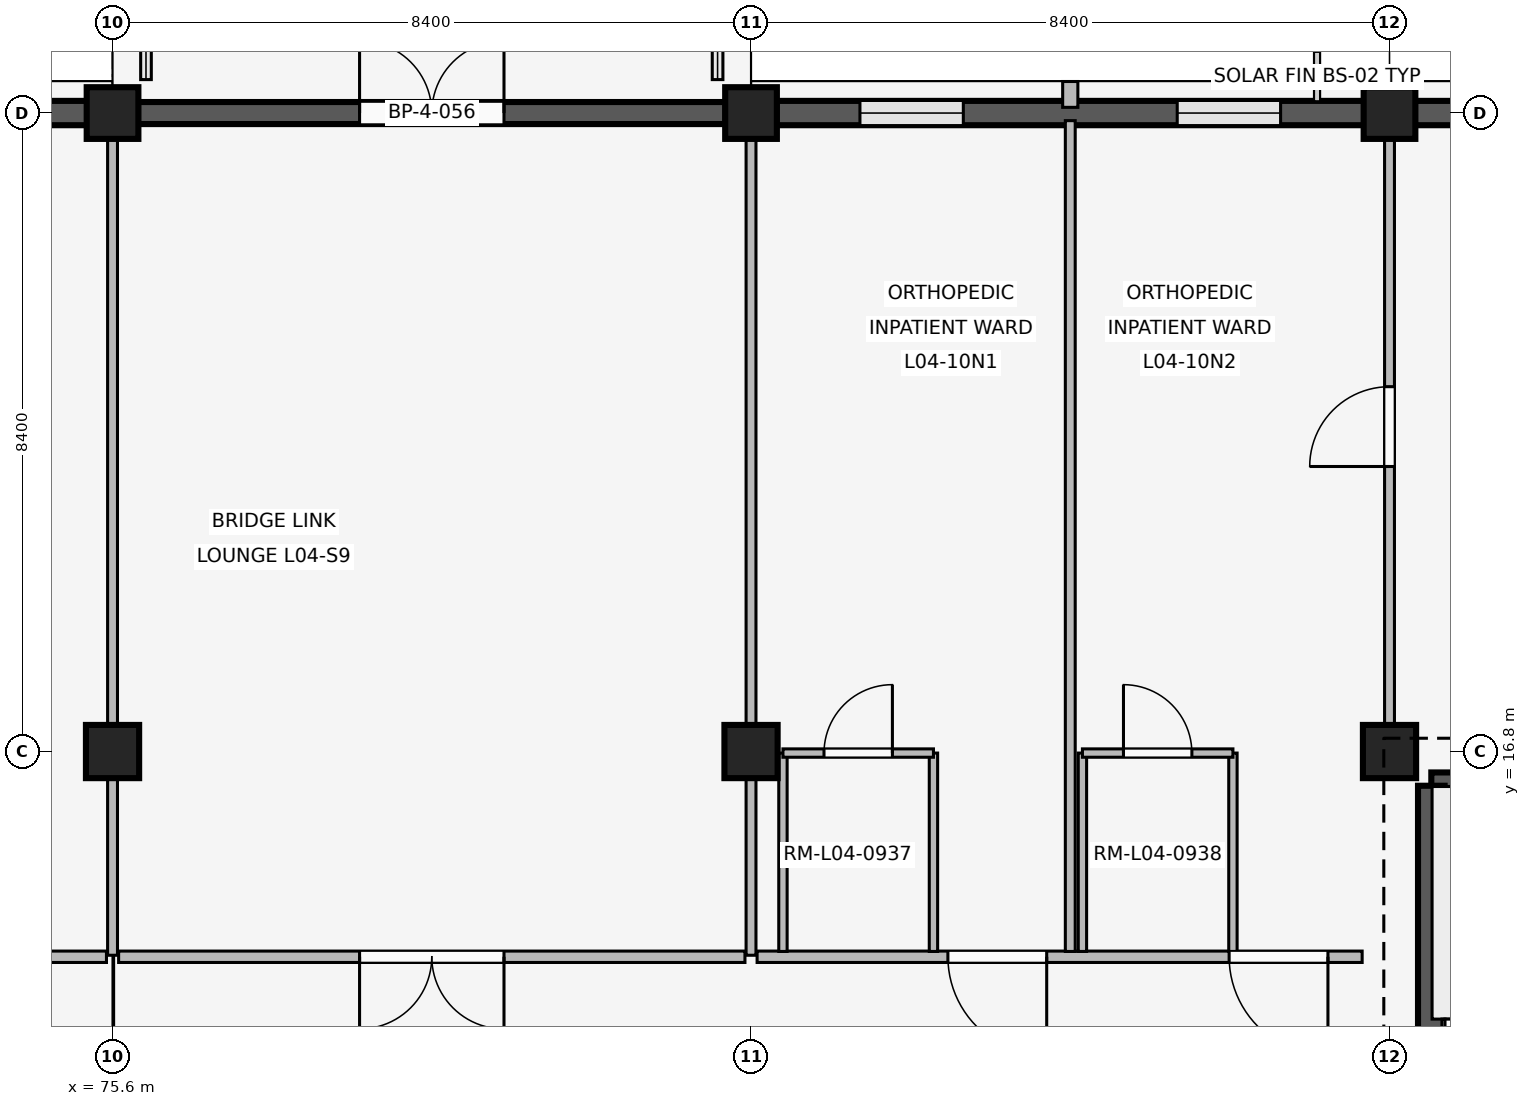
"""IFC4 building model, lengths in metres.
Left out: names, types, materials, properties, quantities, classifications, styles, units other than length and angle.
Written with IfcOpenShell. Run it as: python <this file> out.ifc"""

import sys

from ifc_helpers import new_model, si_unit, direction, frame, frame_2d, origin, origin_2d, place, context, subcontext, project, spatial, rectangle, extrude, element, fill, save


model = new_model("IFC4")
c1 = context("Model", 3, precision=1e-05, world=origin(), true_north=direction((0.0, 1.0)))
c2 = subcontext(c1, "Body", "Model", "MODEL_VIEW")
j1 = project(units=[si_unit("LENGTHUNIT", "METRE"), si_unit("PLANEANGLEUNIT", "RADIAN")], contexts=[c1])
p1 = place(None, origin())
s1 = spatial("IfcSite", under=j1, at=p1, CompositionType="ELEMENT")
p2 = place(p1, origin())
s2 = spatial("IfcBuilding", under=s1, at=p2, CompositionType="ELEMENT")
p3 = place(p2, frame((0.0, 0.0, 16.2)))
s3 = spatial("IfcBuildingStorey", under=s2, at=p3, CompositionType="ELEMENT", Elevation=16.2)
p4 = place(p3, frame((75.6, 16.8, 0.0), z_axis=(0.0, 0.0, 1.0), x_axis=(1.0, 0.0, 0.0)))
e1 = element("IfcColumn", 1, at=p4, inside=s3, PredefinedType="COLUMN", context=c2, shape_type="SweptSolid", body=[
    extrude(rectangle(XDim=0.7, YDim=0.7, at=origin_2d()), origin(), (0.0, 0.0, 1.0), 4.2),
])
p5 = place(p3, frame((75.6, 25.2, 0.0), z_axis=(0.0, 0.0, 1.0), x_axis=(1.0, 0.0, 0.0)))
e2 = element("IfcColumn", 2, at=p5, inside=s3, PredefinedType="COLUMN", context=c2, shape_type="SweptSolid", body=[
    extrude(rectangle(XDim=0.68, YDim=0.68, at=origin_2d()), origin(), (0.0, 0.0, 1.0), 4.2),
])
p6 = place(p3, frame((84.0, 16.8, 0.0), z_axis=(0.0, 0.0, 1.0), x_axis=(1.0, 0.0, 0.0)))
e3 = element("IfcColumn", 3, at=p6, inside=s3, PredefinedType="COLUMN", context=c2, shape_type="SweptSolid", body=[
    extrude(rectangle(XDim=0.7, YDim=0.7, at=origin_2d()), origin(), (0.0, 0.0, 1.0), 4.2),
])
p7 = place(p3, frame((84.0, 25.2, 0.0), z_axis=(0.0, 0.0, 1.0), x_axis=(1.0, 0.0, 0.0)))
e4 = element("IfcColumn", 4, at=p7, inside=s3, PredefinedType="COLUMN", context=c2, shape_type="SweptSolid", body=[
    extrude(rectangle(XDim=0.68, YDim=0.68, at=origin_2d()), origin(), (0.0, 0.0, 1.0), 4.2),
])
p8 = place(p3, frame((92.4, 16.8, 0.0), z_axis=(0.0, 0.0, 1.0), x_axis=(1.0, 0.0, 0.0)))
e5 = element("IfcColumn", 5, at=p8, inside=s3, PredefinedType="COLUMN", context=c2, shape_type="SweptSolid", body=[
    extrude(rectangle(XDim=0.7, YDim=0.7, at=origin_2d()), origin(), (0.0, 0.0, 1.0), 4.2),
])
p9 = place(p3, frame((92.4, 25.2, 0.0), z_axis=(0.0, 0.0, 1.0), x_axis=(1.0, 0.0, 0.0)))
e6 = element("IfcColumn", 6, at=p9, inside=s3, PredefinedType="COLUMN", context=c2, shape_type="SweptSolid", body=[
    extrude(rectangle(XDim=0.68, YDim=0.68, at=origin_2d()), origin(), (0.0, 0.0, 1.0), 4.2),
])
p10 = place(p3, frame((67.535, 25.2, 0.0), z_axis=(0.0, 0.0, 1.0), x_axis=(1.0, 0.0, 0.0)))
e7 = element("IfcWall", 7, at=p10, inside=s3, PredefinedType="SOLIDWALL", context=c2, shape_type="SweptSolid", body=[
    extrude(rectangle(XDim=7.73, YDim=0.32, at=frame_2d((3.865, 0.0))), origin(), (0.0, 0.0, 1.0), 3.32),
])
p11 = place(p10, frame((1.078, 0.0, 0.85)))
e8 = element("IfcOpeningElement", 8, at=p11, cuts=e7, PredefinedType="OPENING", context=c2, shape_type="SweptSolid", body=[
    extrude(rectangle(XDim=1.4, YDim=1.4, at=frame_2d((0.7, 0.7))), frame((0.0, 0.17, 0.0), z_axis=(0.0, -1.0, 0.0), x_axis=(1.0, 0.0, 0.0)), (0.0, 0.0, 1.0), 0.34),
])
p12 = place(p10, frame((5.252, 0.0, 0.85)))
e9 = element("IfcOpeningElement", 9, at=p12, cuts=e7, PredefinedType="OPENING", context=c2, shape_type="SweptSolid", body=[
    extrude(rectangle(XDim=1.4, YDim=1.4, at=frame_2d((0.7, 0.7))), frame((0.0, 0.17, 0.0), z_axis=(0.0, -1.0, 0.0), x_axis=(1.0, 0.0, 0.0)), (0.0, 0.0, 1.0), 0.34),
])
p13 = place(p3, frame((75.935, 25.2, 0.0), z_axis=(0.0, 0.0, 1.0), x_axis=(1.0, 0.0, 0.0)))
e10 = element("IfcWall", 10, at=p13, inside=s3, PredefinedType="SOLIDWALL", context=c2, shape_type="SweptSolid", body=[
    extrude(rectangle(XDim=7.73, YDim=0.29, at=frame_2d((3.865, 0.0))), origin(), (0.0, 0.0, 1.0), 3.32),
])
p14 = place(p13, frame((2.915, 0.0, 0.0)))
e11 = element("IfcOpeningElement", 11, at=p14, cuts=e10, PredefinedType="OPENING", context=c2, shape_type="SweptSolid", body=[
    extrude(rectangle(XDim=1.9, YDim=2.4, at=frame_2d((0.95, 1.2))), frame((0.0, 0.155, 0.0), z_axis=(0.0, -1.0, 0.0), x_axis=(1.0, 0.0, 0.0)), (0.0, 0.0, 1.0), 0.31),
])
p15 = place(p3, frame((84.335, 25.2, 0.0), z_axis=(0.0, 0.0, 1.0), x_axis=(1.0, 0.0, 0.0)))
e12 = element("IfcWall", 12, at=p15, inside=s3, PredefinedType="SOLIDWALL", context=c2, shape_type="SweptSolid", body=[
    extrude(rectangle(XDim=7.73, YDim=0.32, at=frame_2d((3.865, 0.0))), origin(), (0.0, 0.0, 1.0), 3.32),
])
p16 = place(p15, frame((1.098, 0.0, 0.85)))
e13 = element("IfcOpeningElement", 13, at=p16, cuts=e12, PredefinedType="OPENING", context=c2, shape_type="SweptSolid", body=[
    extrude(rectangle(XDim=1.36, YDim=1.42, at=frame_2d((0.68, 0.71))), frame((0.0, 0.17, 0.0), z_axis=(0.0, -1.0, 0.0), x_axis=(1.0, 0.0, 0.0)), (0.0, 0.0, 1.0), 0.34),
])
p17 = place(p15, frame((5.272, 0.0, 0.85)))
e14 = element("IfcOpeningElement", 14, at=p17, cuts=e12, PredefinedType="OPENING", context=c2, shape_type="SweptSolid", body=[
    extrude(rectangle(XDim=1.36, YDim=1.42, at=frame_2d((0.68, 0.71))), frame((0.0, 0.17, 0.0), z_axis=(0.0, -1.0, 0.0), x_axis=(1.0, 0.0, 0.0)), (0.0, 0.0, 1.0), 0.34),
])
p18 = place(p3, frame((88.2, 25.275, 0.0), z_axis=(0.0, 0.0, 1.0), x_axis=(0.0, 1.0, 0.0)))
e15 = element("IfcWall", 15, at=p18, inside=s3, PredefinedType="ELEMENTEDWALL", context=c2, shape_type="SweptSolid", body=[
    extrude(rectangle(XDim=0.34, YDim=0.2, at=frame_2d((0.17, 0.0))), origin(), (0.0, 0.0, 1.0), 3.3),
])
p19 = place(p3, frame((92.735, 25.2, 0.0), z_axis=(0.0, 0.0, 1.0), x_axis=(1.0, 0.0, 0.0)))
e16 = element("IfcWall", 16, at=p19, inside=s3, PredefinedType="SOLIDWALL", context=c2, shape_type="SweptSolid", body=[
    extrude(rectangle(XDim=7.73, YDim=0.32, at=frame_2d((3.865, 0.0))), origin(), (0.0, 0.0, 1.0), 3.32),
])
p20 = place(p19, frame((1.138, 0.0, 0.85)))
e17 = element("IfcOpeningElement", 17, at=p20, cuts=e16, PredefinedType="OPENING", context=c2, shape_type="SweptSolid", body=[
    extrude(rectangle(XDim=1.28, YDim=1.38, at=frame_2d((0.64, 0.69))), frame((0.0, 0.17, 0.0), z_axis=(0.0, -1.0, 0.0), x_axis=(1.0, 0.0, 0.0)), (0.0, 0.0, 1.0), 0.34),
])
p21 = place(p19, frame((5.312, 0.0, 0.85)))
e18 = element("IfcOpeningElement", 18, at=p21, cuts=e16, PredefinedType="OPENING", context=c2, shape_type="SweptSolid", body=[
    extrude(rectangle(XDim=1.28, YDim=1.38, at=frame_2d((0.64, 0.69))), frame((0.0, 0.17, 0.0), z_axis=(0.0, -1.0, 0.0), x_axis=(1.0, 0.0, 0.0)), (0.0, 0.0, 1.0), 0.34),
])
p22 = place(p3, frame((92.95, 16.35, 0.0), z_axis=(0.0, 0.0, 1.0), x_axis=(1.0, 0.0, 0.0)))
e19 = element("IfcWall", 19, at=p22, inside=s3, PredefinedType="SHEAR", context=c2, shape_type="SweptSolid", body=[
    extrude(rectangle(XDim=7.5, YDim=0.35, at=frame_2d((3.75, 0.0))), origin(), (0.0, 0.0, 1.0), 3.92),
])
p23 = place(p3, frame((92.95, 8.8, 0.0), z_axis=(0.0, 0.0, 1.0), x_axis=(0.0, 1.0, 0.0)))
e20 = element("IfcWall", 20, at=p23, inside=s3, PredefinedType="SHEAR", context=c2, shape_type="SweptSolid", body=[
    extrude(rectangle(XDim=7.55, YDim=0.35, at=frame_2d((3.775, 0.0))), origin(), (0.0, 0.0, 1.0), 3.92),
])
p24 = place(p23, frame((0.28, 0.0, 0.0)))
e21 = element("IfcOpeningElement", 21, at=p24, cuts=e20, PredefinedType="OPENING", context=c2, shape_type="SweptSolid", body=[
    extrude(rectangle(XDim=1.0, YDim=2.15, at=frame_2d((0.5, 1.075))), frame((0.0, 0.185, 0.0), z_axis=(0.0, -1.0, 0.0), x_axis=(1.0, 0.0, 0.0)), (0.0, 0.0, 1.0), 0.37),
])
p25 = place(p3, frame((75.52, 14.1, 0.0), z_axis=(0.0, 0.0, 1.0), x_axis=(-1.0, 0.0, 0.0)))
e22 = element("IfcWall", 22, at=p25, inside=s3, PredefinedType="PARTITIONING", context=c2, shape_type="SweptSolid", body=[
    extrude(rectangle(XDim=8.24, YDim=0.15, at=frame_2d((4.12, 0.0))), origin(), (0.0, 0.0, 1.0), 3.3),
])
p26 = place(p25, frame((3.495, 0.0, 0.0)))
e23 = element("IfcOpeningElement", 23, at=p26, cuts=e22, PredefinedType="OPENING", context=c2, shape_type="SweptSolid", body=[
    extrude(rectangle(XDim=1.25, YDim=2.2, at=frame_2d((0.625, 1.1))), frame((0.0, 0.085, 0.0), z_axis=(0.0, -1.0, 0.0), x_axis=(1.0, 0.0, 0.0)), (0.0, 0.0, 1.0), 0.17),
])
p27 = place(p3, frame((75.6, 14.12, 0.0), z_axis=(0.0, 0.0, 1.0), x_axis=(0.0, 1.0, 0.0)))
e24 = element("IfcWall", 24, at=p27, inside=s3, PredefinedType="PARTITIONING", context=c2, shape_type="SweptSolid", body=[
    extrude(rectangle(XDim=10.94, YDim=0.13, at=frame_2d((5.47, 0.0))), origin(), (0.0, 0.0, 1.0), 3.3),
])
p28 = place(p3, frame((83.92, 14.1, 0.0), z_axis=(0.0, 0.0, 1.0), x_axis=(-1.0, 0.0, 0.0)))
e25 = element("IfcWall", 25, at=p28, inside=s3, PredefinedType="PARTITIONING", context=c2, shape_type="SweptSolid", body=[
    extrude(rectangle(XDim=8.24, YDim=0.15, at=frame_2d((4.12, 0.0))), origin(), (0.0, 0.0, 1.0), 3.3),
])
p29 = place(p28, frame((3.17, 0.0, 0.0)))
e26 = element("IfcOpeningElement", 26, at=p29, cuts=e25, PredefinedType="OPENING", context=c2, shape_type="SweptSolid", body=[
    extrude(rectangle(XDim=1.9, YDim=2.4, at=frame_2d((0.95, 1.2))), frame((0.0, 0.085, 0.0), z_axis=(0.0, -1.0, 0.0), x_axis=(1.0, 0.0, 0.0)), (0.0, 0.0, 1.0), 0.17),
])
p30 = place(p3, frame((84.0, 14.12, 0.0), z_axis=(0.0, 0.0, 1.0), x_axis=(0.0, 1.0, 0.0)))
e27 = element("IfcWall", 27, at=p30, inside=s3, PredefinedType="PARTITIONING", context=c2, shape_type="SweptSolid", body=[
    extrude(rectangle(XDim=10.94, YDim=0.13, at=frame_2d((5.47, 0.0))), origin(), (0.0, 0.0, 1.0), 3.3),
])
p31 = place(p3, frame((92.04, 14.1, 0.0), z_axis=(0.0, 0.0, 1.0), x_axis=(-1.0, 0.0, 0.0)))
e28 = element("IfcWall", 28, at=p31, inside=s3, PredefinedType="PARTITIONING", context=c2, shape_type="SweptSolid", body=[
    extrude(rectangle(XDim=7.96, YDim=0.15, at=frame_2d((3.98, 0.0))), origin(), (0.0, 0.0, 1.0), 3.3),
])
p32 = place(p31, frame((0.45, 0.0, 0.0)))
e29 = element("IfcOpeningElement", 29, at=p32, cuts=e28, PredefinedType="OPENING", context=c2, shape_type="SweptSolid", body=[
    extrude(rectangle(XDim=1.3, YDim=2.25, at=frame_2d((0.65, 1.125))), frame((0.0, 0.085, 0.0), z_axis=(0.0, -1.0, 0.0), x_axis=(1.0, 0.0, 0.0)), (0.0, 0.0, 1.0), 0.17),
])
p33 = place(p31, frame((4.15, 0.0, 0.0)))
e30 = element("IfcOpeningElement", 30, at=p33, cuts=e28, PredefinedType="OPENING", context=c2, shape_type="SweptSolid", body=[
    extrude(rectangle(XDim=1.3, YDim=2.25, at=frame_2d((0.65, 1.125))), frame((0.0, 0.085, 0.0), z_axis=(0.0, -1.0, 0.0), x_axis=(1.0, 0.0, 0.0)), (0.0, 0.0, 1.0), 0.17),
])
p34 = place(p3, frame((88.2, 14.17, 0.0), z_axis=(0.0, 0.0, 1.0), x_axis=(0.0, 1.0, 0.0)))
e31 = element("IfcWall", 31, at=p34, inside=s3, PredefinedType="PARTITIONING", context=c2, shape_type="SweptSolid", body=[
    extrude(rectangle(XDim=10.93, YDim=0.13, at=frame_2d((5.465, 0.0))), origin(), (0.0, 0.0, 1.0), 3.3),
])
for number, where, z_axis, x_axis in (
    (32, (84.42, 14.17, 0.0), (0.0, 0.0, 1.0), (0.0, 1.0, 0.0)),
    (33, (86.4, 14.17, 0.0), (0.0, 0.0, 1.0), (0.0, 1.0, 0.0)),
):
    element("IfcWall", number, at=place(p3, frame(where, z_axis=z_axis, x_axis=x_axis)), inside=s3, PredefinedType="PARTITIONING", context=c2, shape_type="SweptSolid", body=[
        extrude(rectangle(XDim=2.61, YDim=0.11, at=frame_2d((1.305, 0.0))), origin(), (0.0, 0.0, 1.0), 3.3),
    ])
p35 = place(p3, frame((84.42, 16.78, 0.0), z_axis=(0.0, 0.0, 1.0), x_axis=(1.0, 0.0, 0.0)))
e34 = element("IfcWall", 34, at=p35, inside=s3, PredefinedType="PARTITIONING", context=c2, shape_type="SweptSolid", body=[
    extrude(rectangle(XDim=1.98, YDim=0.11, at=frame_2d((0.99, 0.0))), origin(), (0.0, 0.0, 1.0), 3.3),
])
p36 = place(p35, frame((0.54, 0.0, 0.0)))
e35 = element("IfcOpeningElement", 35, at=p36, cuts=e34, PredefinedType="OPENING", context=c2, shape_type="SweptSolid", body=[
    extrude(rectangle(XDim=0.9, YDim=2.1, at=frame_2d((0.45, 1.05))), frame((0.0, 0.065, 0.0), z_axis=(0.0, -1.0, 0.0), x_axis=(1.0, 0.0, 0.0)), (0.0, 0.0, 1.0), 0.13),
])
for number, where, z_axis, x_axis in (
    (36, (88.36, 14.17, 0.0), (0.0, 0.0, 1.0), (0.0, 1.0, 0.0)),
    (37, (90.34, 14.17, 0.0), (0.0, 0.0, 1.0), (0.0, 1.0, 0.0)),
):
    element("IfcWall", number, at=place(p3, frame(where, z_axis=z_axis, x_axis=x_axis)), inside=s3, PredefinedType="PARTITIONING", context=c2, shape_type="SweptSolid", body=[
        extrude(rectangle(XDim=2.61, YDim=0.11, at=frame_2d((1.305, 0.0))), origin(), (0.0, 0.0, 1.0), 3.3),
    ])
p37 = place(p3, frame((88.36, 16.78, 0.0), z_axis=(0.0, 0.0, 1.0), x_axis=(1.0, 0.0, 0.0)))
e38 = element("IfcWall", 38, at=p37, inside=s3, PredefinedType="PARTITIONING", context=c2, shape_type="SweptSolid", body=[
    extrude(rectangle(XDim=1.98, YDim=0.11, at=frame_2d((0.99, 0.0))), origin(), (0.0, 0.0, 1.0), 3.3),
])
p38 = place(p37, frame((0.54, 0.0, 0.0)))
e39 = element("IfcOpeningElement", 39, at=p38, cuts=e38, PredefinedType="OPENING", context=c2, shape_type="SweptSolid", body=[
    extrude(rectangle(XDim=0.9, YDim=2.1, at=frame_2d((0.45, 1.05))), frame((0.0, 0.065, 0.0), z_axis=(0.0, -1.0, 0.0), x_axis=(1.0, 0.0, 0.0)), (0.0, 0.0, 1.0), 0.13),
])
p39 = place(p3, frame((92.4, 17.15, 0.0), z_axis=(0.0, 0.0, 1.0), x_axis=(0.0, 1.0, 0.0)))
e40 = element("IfcWall", 40, at=p39, inside=s3, PredefinedType="PARTITIONING", context=c2, shape_type="SweptSolid", body=[
    extrude(rectangle(XDim=7.91, YDim=0.13, at=frame_2d((3.955, 0.0))), origin(), (0.0, 0.0, 1.0), 3.3),
])
p40 = place(p39, frame((3.4, 0.0, 0.0)))
e41 = element("IfcOpeningElement", 41, at=p40, cuts=e40, PredefinedType="OPENING", context=c2, shape_type="SweptSolid", body=[
    extrude(rectangle(XDim=1.05, YDim=2.2, at=frame_2d((0.525, 1.1))), frame((0.0, 0.075, 0.0), z_axis=(0.0, -1.0, 0.0), x_axis=(1.0, 0.0, 0.0)), (0.0, 0.0, 1.0), 0.15),
])
p41 = place(p14, origin())
e42 = element("IfcDoor", 42, at=p41, inside=s3, OperationType="DOUBLE_SWING_LEFT", PredefinedType="DOOR", context=c2, shape_type="SweptSolid", body=[
    extrude(rectangle(XDim=1.9, YDim=2.4, at=frame_2d((0.95, 1.2))), frame((0.0, 0.025, 0.0), z_axis=(0.0, -1.0, 0.0), x_axis=(1.0, 0.0, 0.0)), (0.0, 0.0, 1.0), 0.05),
])
fill(e11, e42)
p42 = place(p16, origin())
e43 = element("IfcWindow", 43, at=p42, inside=s3, PartitioningType="SINGLE_PANEL", PredefinedType="WINDOW", context=c2, shape_type="SweptSolid", body=[
    extrude(rectangle(XDim=1.36, YDim=1.42, at=frame_2d((0.68, 0.71))), frame((0.0, 0.03, 0.0), z_axis=(0.0, -1.0, 0.0), x_axis=(1.0, 0.0, 0.0)), (0.0, 0.0, 1.0), 0.06),
])
fill(e13, e43)
p43 = place(p17, origin())
e44 = element("IfcWindow", 44, at=p43, inside=s3, PartitioningType="SINGLE_PANEL", PredefinedType="WINDOW", context=c2, shape_type="SweptSolid", body=[
    extrude(rectangle(XDim=1.36, YDim=1.42, at=frame_2d((0.68, 0.71))), frame((0.0, 0.03, 0.0), z_axis=(0.0, -1.0, 0.0), x_axis=(1.0, 0.0, 0.0)), (0.0, 0.0, 1.0), 0.06),
])
fill(e14, e44)
p44 = place(p29, origin())
e45 = element("IfcDoor", 45, at=p44, inside=s3, OperationType="DOUBLE_SWING_LEFT", PredefinedType="DOOR", context=c2, shape_type="SweptSolid", body=[
    extrude(rectangle(XDim=1.9, YDim=2.4, at=frame_2d((0.95, 1.2))), frame((0.0, 0.025, 0.0), z_axis=(0.0, -1.0, 0.0), x_axis=(1.0, 0.0, 0.0)), (0.0, 0.0, 1.0), 0.05),
])
fill(e26, e45)
p45 = place(p32, origin())
e46 = element("IfcDoor", 46, at=p45, inside=s3, OperationType="SINGLE_SWING_LEFT", PredefinedType="DOOR", context=c2, shape_type="SweptSolid", body=[
    extrude(rectangle(XDim=1.3, YDim=2.25, at=frame_2d((0.65, 1.125))), frame((0.0, 0.025, 0.0), z_axis=(0.0, -1.0, 0.0), x_axis=(1.0, 0.0, 0.0)), (0.0, 0.0, 1.0), 0.05),
])
fill(e29, e46)
p46 = place(p33, origin())
e47 = element("IfcDoor", 47, at=p46, inside=s3, OperationType="SINGLE_SWING_LEFT", PredefinedType="DOOR", context=c2, shape_type="SweptSolid", body=[
    extrude(rectangle(XDim=1.3, YDim=2.25, at=frame_2d((0.65, 1.125))), frame((0.0, 0.025, 0.0), z_axis=(0.0, -1.0, 0.0), x_axis=(1.0, 0.0, 0.0)), (0.0, 0.0, 1.0), 0.05),
])
fill(e30, e47)
p47 = place(p36, origin())
e48 = element("IfcDoor", 48, at=p47, inside=s3, OperationType="SINGLE_SWING_RIGHT", PredefinedType="DOOR", context=c2, shape_type="SweptSolid", body=[
    extrude(rectangle(XDim=0.9, YDim=2.1, at=frame_2d((0.45, 1.05))), frame((0.0, 0.025, 0.0), z_axis=(0.0, -1.0, 0.0), x_axis=(1.0, 0.0, 0.0)), (0.0, 0.0, 1.0), 0.05),
])
fill(e35, e48)
p48 = place(p38, origin())
e49 = element("IfcDoor", 49, at=p48, inside=s3, OperationType="SINGLE_SWING_LEFT", PredefinedType="DOOR", context=c2, shape_type="SweptSolid", body=[
    extrude(rectangle(XDim=0.9, YDim=2.1, at=frame_2d((0.45, 1.05))), frame((0.0, 0.025, 0.0), z_axis=(0.0, -1.0, 0.0), x_axis=(1.0, 0.0, 0.0)), (0.0, 0.0, 1.0), 0.05),
])
fill(e39, e49)
p49 = place(p40, origin())
e50 = element("IfcDoor", 50, at=p49, inside=s3, OperationType="SINGLE_SWING_LEFT", PredefinedType="DOOR", context=c2, shape_type="SweptSolid", body=[
    extrude(rectangle(XDim=1.05, YDim=2.2, at=frame_2d((0.525, 1.1))), frame((0.0, 0.025, 0.0), z_axis=(0.0, -1.0, 0.0), x_axis=(1.0, 0.0, 0.0)), (0.0, 0.0, 1.0), 0.05),
])
fill(e41, e50)
save(model, sys.argv[1])
